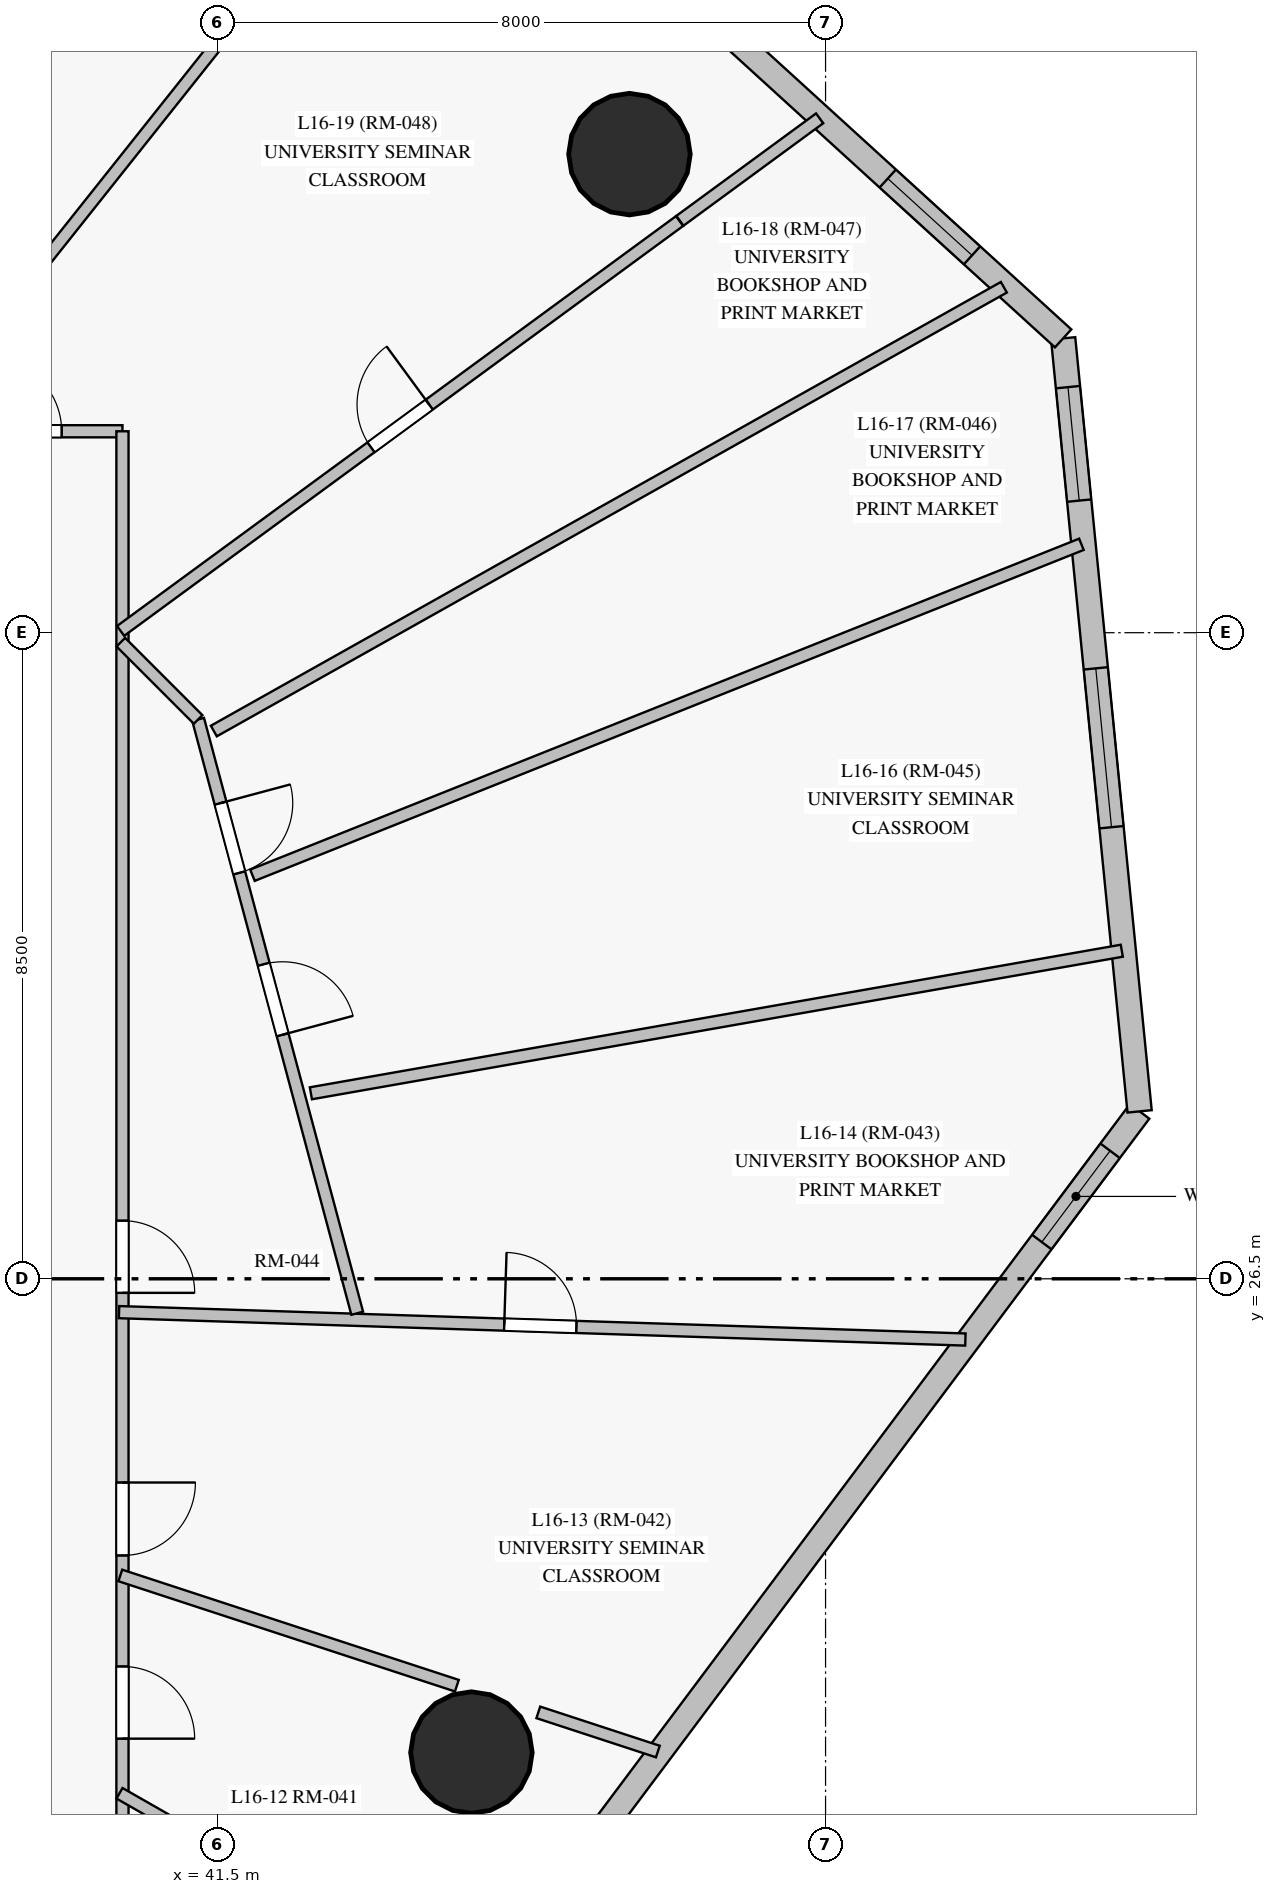
"""IFC4 building model, lengths in metres.
Left out: names, types, materials, properties, quantities, classifications, styles, units other than length and angle.
Written with IfcOpenShell. Run it as: python <this file> out.ifc"""

import sys

from ifc_helpers import new_model, si_unit, direction, frame, frame_2d, origin, origin_with_axes, origin_2d, place, context, subcontext, project, spatial, rectangle, circle, extrude, source, transform, mapped, element, fill, save


model = new_model("IFC4")
c1 = context("Model", 3, precision=1e-05, world=origin(), true_north=direction((0.0, 1.0)))
c2 = subcontext(c1, "Body", "Model", "MODEL_VIEW")
j1 = project(units=[si_unit("LENGTHUNIT", "METRE"), si_unit("PLANEANGLEUNIT", "RADIAN")], contexts=[c1])
p1 = place(None, origin())
s1 = spatial("IfcSite", under=j1, at=p1, CompositionType="ELEMENT")
p2 = place(p1, origin())
s2 = spatial("IfcBuilding", under=s1, at=p2, CompositionType="ELEMENT")
p3 = place(p2, frame((0.0, 0.0, 62.5)))
s3 = spatial("IfcBuildingStorey", under=s2, at=p3, CompositionType="ELEMENT", Elevation=62.5)
m1 = source(origin_with_axes(), c2, "Body", "SweptSolid", [
    extrude(circle(Radius=0.8, at=origin_2d()), origin(), (0.0, 0.0, 1.0), 3.6),
])
for number, where, z_axis, x_axis in (
    (1, (44.841, 20.267, 0.0), (0.0, 0.0, 1.0), (1.0, 0.0, 0.0)),
    (2, (46.92, 41.296, 0.0), (0.0, 0.0, 1.0), (1.0, 0.0, 0.0)),
):
    element("IfcColumn", number, at=place(p3, frame(where, z_axis=z_axis, x_axis=x_axis)), inside=s3, PredefinedType="COLUMN", context=c2, shape_type="MappedRepresentation", body=[
        mapped(m1, transform((0.0, 0.0, 0.0), scale=1.0)),
    ])
p4 = place(p3, frame((44.454, 16.438, 0.0), z_axis=(0.0, 0.0, 1.0), x_axis=(0.599150494903, 0.800636424638, 0.0)))
e3 = element("IfcWall", 3, at=p4, inside=s3, PredefinedType="SOLIDWALL", context=c2, shape_type="SweptSolid", body=[
    extrude(rectangle(XDim=15.318, YDim=0.32, at=frame_2d((7.659, 0.0))), origin(), (0.0, 0.0, 1.0), 3.35),
])
p5 = place(p4, frame((1.194, 0.0, 0.85)))
e4 = element("IfcOpeningElement", 4, at=p5, cuts=e3, PredefinedType="OPENING", context=c2, shape_type="SweptSolid", body=[
    extrude(rectangle(XDim=1.8, YDim=1.85, at=frame_2d((0.9, 0.925))), frame((0.0, 0.17, 0.0), z_axis=(0.0, -1.0, 0.0), x_axis=(1.0, 0.0, 0.0)), (0.0, 0.0, 1.0), 0.34),
])
p6 = place(p4, frame((13.171, 0.0, 0.85)))
e5 = element("IfcOpeningElement", 5, at=p6, cuts=e3, PredefinedType="OPENING", context=c2, shape_type="SweptSolid", body=[
    extrude(rectangle(XDim=1.5, YDim=1.85, at=frame_2d((0.75, 0.925))), frame((0.0, 0.17, 0.0), z_axis=(0.0, -1.0, 0.0), x_axis=(1.0, 0.0, 0.0)), (0.0, 0.0, 1.0), 0.34),
])
p7 = place(p3, frame((53.632, 28.703, 0.0), z_axis=(0.0, 0.0, 1.0), x_axis=(-0.098429761433, 0.995144000667, 0.0)))
e6 = element("IfcWall", 6, at=p7, inside=s3, PredefinedType="SOLIDWALL", context=c2, shape_type="SweptSolid", body=[
    extrude(rectangle(XDim=10.219, YDim=0.32, at=frame_2d((5.109, 0.0))), origin(), (0.0, 0.0, 1.0), 3.35),
])
p8 = place(p7, frame((3.757, 0.0, 0.85)))
e7 = element("IfcOpeningElement", 7, at=p8, cuts=e6, PredefinedType="OPENING", context=c2, shape_type="SweptSolid", body=[
    extrude(rectangle(XDim=2.1, YDim=1.95, at=frame_2d((1.05, 0.975))), frame((0.0, 0.17, 0.0), z_axis=(0.0, -1.0, 0.0), x_axis=(1.0, 0.0, 0.0)), (0.0, 0.0, 1.0), 0.34),
])
p9 = place(p7, frame((8.074, 0.0, 0.85)))
e8 = element("IfcOpeningElement", 8, at=p9, cuts=e6, PredefinedType="OPENING", context=c2, shape_type="SweptSolid", body=[
    extrude(rectangle(XDim=1.5, YDim=1.85, at=frame_2d((0.75, 0.925))), frame((0.0, 0.17, 0.0), z_axis=(0.0, -1.0, 0.0), x_axis=(1.0, 0.0, 0.0)), (0.0, 0.0, 1.0), 0.34),
])
p10 = place(p3, frame((52.626, 38.872, 0.0), z_axis=(0.0, 0.0, 1.0), x_axis=(-0.739069015005, 0.673629713611, 0.0)))
e9 = element("IfcWall", 9, at=p10, inside=s3, PredefinedType="SOLIDWALL", context=c2, shape_type="SweptSolid", body=[
    extrude(rectangle(XDim=12.729, YDim=0.32, at=frame_2d((6.365, 0.0))), origin(), (0.0, 0.0, 1.0), 3.02),
])
p11 = place(p10, frame((1.622, 0.0, 0.85)))
e10 = element("IfcOpeningElement", 10, at=p11, cuts=e9, PredefinedType="OPENING", context=c2, shape_type="SweptSolid", body=[
    extrude(rectangle(XDim=1.5, YDim=1.85, at=frame_2d((0.75, 0.925))), frame((0.0, 0.17, 0.0), z_axis=(0.0, -1.0, 0.0), x_axis=(1.0, 0.0, 0.0)), (0.0, 0.0, 1.0), 0.34),
])
p12 = place(p10, frame((8.089, 0.0, 0.85)))
e11 = element("IfcOpeningElement", 11, at=p12, cuts=e9, PredefinedType="OPENING", context=c2, shape_type="SweptSolid", body=[
    extrude(rectangle(XDim=2.1, YDim=1.95, at=frame_2d((1.05, 0.975))), frame((0.0, 0.17, 0.0), z_axis=(0.0, -1.0, 0.0), x_axis=(1.0, 0.0, 0.0)), (0.0, 0.0, 1.0), 0.34),
])
p13 = place(p3, frame((10.5, 37.65, 0.0), z_axis=(0.0, 0.0, 1.0), x_axis=(1.0, 0.0, 0.0)))
e12 = element("IfcWall", 12, at=p13, inside=s3, PredefinedType="PARTITIONING", context=c2, shape_type="SweptSolid", body=[
    extrude(rectangle(XDim=29.75, YDim=0.16, at=frame_2d((14.875, 0.0))), origin(), (0.0, 0.0, 1.0), 2.75),
])
p14 = place(p13, frame((27.99, 0.0, 0.0)))
e13 = element("IfcOpeningElement", 13, at=p14, cuts=e12, PredefinedType="OPENING", context=c2, shape_type="SweptSolid", body=[
    extrude(rectangle(XDim=0.96, YDim=2.15, at=frame_2d((0.48, 1.075))), frame((0.0, 0.09, 0.0), z_axis=(0.0, -1.0, 0.0), x_axis=(1.0, 0.0, 0.0)), (0.0, 0.0, 1.0), 0.18),
])
p15 = place(p13, frame((25.342, 0.0, 0.0)))
e14 = element("IfcOpeningElement", 14, at=p15, cuts=e12, PredefinedType="OPENING", context=c2, shape_type="SweptSolid", body=[
    extrude(rectangle(XDim=0.95, YDim=2.15, at=frame_2d((0.475, 1.075))), frame((0.0, 0.09, 0.0), z_axis=(0.0, -1.0, 0.0), x_axis=(1.0, 0.0, 0.0)), (0.0, 0.0, 1.0), 0.18),
])
p16 = place(p13, frame((22.028, 0.0, 0.0)))
e15 = element("IfcOpeningElement", 15, at=p16, cuts=e12, PredefinedType="OPENING", context=c2, shape_type="SweptSolid", body=[
    extrude(rectangle(XDim=0.95, YDim=2.15, at=frame_2d((0.475, 1.075))), frame((0.0, 0.09, 0.0), z_axis=(0.0, -1.0, 0.0), x_axis=(1.0, 0.0, 0.0)), (0.0, 0.0, 1.0), 0.18),
])
p17 = place(p13, frame((20.31, 0.0, 0.0)))
e16 = element("IfcOpeningElement", 16, at=p17, cuts=e12, PredefinedType="OPENING", context=c2, shape_type="SweptSolid", body=[
    extrude(rectangle(XDim=0.96, YDim=2.15, at=frame_2d((0.48, 1.075))), frame((0.0, 0.09, 0.0), z_axis=(0.0, -1.0, 0.0), x_axis=(1.0, 0.0, 0.0)), (0.0, 0.0, 1.0), 0.18),
])
p18 = place(p13, frame((14.54, 0.0, 0.0)))
e17 = element("IfcOpeningElement", 17, at=p18, cuts=e12, PredefinedType="OPENING", context=c2, shape_type="SweptSolid", body=[
    extrude(rectangle(XDim=0.95, YDim=2.15, at=frame_2d((0.475, 1.075))), frame((0.0, 0.09, 0.0), z_axis=(0.0, -1.0, 0.0), x_axis=(1.0, 0.0, 0.0)), (0.0, 0.0, 1.0), 0.18),
])
p19 = place(p13, frame((12.43, 0.0, 0.0)))
e18 = element("IfcOpeningElement", 18, at=p19, cuts=e12, PredefinedType="OPENING", context=c2, shape_type="SweptSolid", body=[
    extrude(rectangle(XDim=0.96, YDim=2.15, at=frame_2d((0.48, 1.075))), frame((0.0, 0.09, 0.0), z_axis=(0.0, -1.0, 0.0), x_axis=(1.0, 0.0, 0.0)), (0.0, 0.0, 1.0), 0.18),
])
p20 = place(p13, frame((9.938, 0.0, 0.0)))
e19 = element("IfcOpeningElement", 19, at=p20, cuts=e12, PredefinedType="OPENING", context=c2, shape_type="SweptSolid", body=[
    extrude(rectangle(XDim=0.95, YDim=2.15, at=frame_2d((0.475, 1.075))), frame((0.0, 0.09, 0.0), z_axis=(0.0, -1.0, 0.0), x_axis=(1.0, 0.0, 0.0)), (0.0, 0.0, 1.0), 0.18),
])
p21 = place(p13, frame((6.962, 0.0, 0.0)))
e20 = element("IfcOpeningElement", 20, at=p21, cuts=e12, PredefinedType="OPENING", context=c2, shape_type="SweptSolid", body=[
    extrude(rectangle(XDim=0.95, YDim=2.15, at=frame_2d((0.475, 1.075))), frame((0.0, 0.09, 0.0), z_axis=(0.0, -1.0, 0.0), x_axis=(1.0, 0.0, 0.0)), (0.0, 0.0, 1.0), 0.18),
])
p22 = place(p3, frame((40.25, 37.65, 0.0), z_axis=(0.0, 0.0, 1.0), x_axis=(0.0, -1.0, 0.0)))
e21 = element("IfcWall", 21, at=p22, inside=s3, PredefinedType="PARTITIONING", context=c2, shape_type="SweptSolid", body=[
    extrude(rectangle(XDim=22.3, YDim=0.16, at=frame_2d((11.15, 0.0))), origin(), (0.0, 0.0, 1.0), 2.75),
])
p23 = place(p22, frame((16.25, 0.0, 0.0)))
e22 = element("IfcOpeningElement", 22, at=p23, cuts=e21, PredefinedType="OPENING", context=c2, shape_type="SweptSolid", body=[
    extrude(rectangle(XDim=0.95, YDim=2.15, at=frame_2d((0.475, 1.075))), frame((0.0, 0.09, 0.0), z_axis=(0.0, -1.0, 0.0), x_axis=(1.0, 0.0, 0.0)), (0.0, 0.0, 1.0), 0.18),
])
p24 = place(p22, frame((13.83, 0.0, 0.0)))
e23 = element("IfcOpeningElement", 23, at=p24, cuts=e21, PredefinedType="OPENING", context=c2, shape_type="SweptSolid", body=[
    extrude(rectangle(XDim=0.96, YDim=2.15, at=frame_2d((0.48, 1.075))), frame((0.0, 0.09, 0.0), z_axis=(0.0, -1.0, 0.0), x_axis=(1.0, 0.0, 0.0)), (0.0, 0.0, 1.0), 0.18),
])
p25 = place(p22, frame((10.385, 0.0, 0.0)))
e24 = element("IfcOpeningElement", 24, at=p25, cuts=e21, PredefinedType="OPENING", context=c2, shape_type="SweptSolid", body=[
    extrude(rectangle(XDim=0.95, YDim=2.15, at=frame_2d((0.475, 1.075))), frame((0.0, 0.09, 0.0), z_axis=(0.0, -1.0, 0.0), x_axis=(1.0, 0.0, 0.0)), (0.0, 0.0, 1.0), 0.18),
])
p26 = place(p3, frame((41.452, 33.706, 0.0), z_axis=(0.0, 0.0, 1.0), x_axis=(0.87188055056, 0.489718598335, 0.0)))
e25 = element("IfcWall", 25, at=p26, inside=s3, PredefinedType="PARTITIONING", context=c2, shape_type="SweptSolid", body=[
    extrude(rectangle(XDim=11.921, YDim=0.16, at=frame_2d((5.961, 0.0))), origin(), (0.0, 0.0, 1.0), 3.35),
])
p27 = place(p3, frame((35.215, 37.624, 0.0), z_axis=(0.0, 0.0, 1.0), x_axis=(0.512861528195, 0.858471346579, 0.0)))
e26 = element("IfcWall", 26, at=p27, inside=s3, PredefinedType="PARTITIONING", context=c2, shape_type="SweptSolid", body=[
    extrude(rectangle(XDim=11.914, YDim=0.16, at=frame_2d((5.957, 0.0))), origin(), (0.0, 0.0, 1.0), 3.35),
])
p28 = place(p3, frame((41.96, 31.809, 0.0), z_axis=(0.0, 0.0, 1.0), x_axis=(0.928727403057, 0.370763281368, 0.0)))
e27 = element("IfcWall", 27, at=p28, inside=s3, PredefinedType="PARTITIONING", context=c2, shape_type="SweptSolid", body=[
    extrude(rectangle(XDim=11.743, YDim=0.16, at=frame_2d((5.871, 0.0))), origin(), (0.0, 0.0, 1.0), 3.35),
])
p29 = place(p3, frame((37.426, 37.626, 0.0), z_axis=(0.0, 0.0, 1.0), x_axis=(0.62246479183, 0.782647802611, 0.0)))
e28 = element("IfcWall", 28, at=p29, inside=s3, PredefinedType="PARTITIONING", context=c2, shape_type="SweptSolid", body=[
    extrude(rectangle(XDim=11.16, YDim=0.16, at=frame_2d((5.58, 0.0))), origin(), (0.0, 0.0, 1.0), 3.35),
])
p30 = place(p3, frame((40.205, 26.061, 0.0), z_axis=(0.0, 0.0, 1.0), x_axis=(0.999476714484, -0.032346517653, 0.0)))
e29 = element("IfcWall", 29, at=p30, inside=s3, PredefinedType="PARTITIONING", context=c2, shape_type="SweptSolid", body=[
    extrude(rectangle(XDim=11.14, YDim=0.16, at=frame_2d((5.57, 0.0))), origin(), (0.0, 0.0, 1.0), 3.02),
])
p31 = place(p30, frame((5.07, 0.0, 0.0)))
e30 = element("IfcOpeningElement", 30, at=p31, cuts=e29, PredefinedType="OPENING", context=c2, shape_type="SweptSolid", body=[
    extrude(rectangle(XDim=0.95, YDim=2.15, at=frame_2d((0.475, 1.075))), frame((0.0, 0.09, 0.0), z_axis=(0.0, -1.0, 0.0), x_axis=(1.0, 0.0, 0.0)), (0.0, 0.0, 1.0), 0.18),
])
p32 = place(p3, frame((42.729, 28.94, 0.0), z_axis=(0.0, 0.0, 1.0), x_axis=(0.984896798887, 0.173142414048, 0.0)))
e31 = element("IfcWall", 31, at=p32, inside=s3, PredefinedType="PARTITIONING", context=c2, shape_type="SweptSolid", body=[
    extrude(rectangle(XDim=10.832, YDim=0.16, at=frame_2d((5.416, 0.0))), origin(), (0.0, 0.0, 1.0), 3.35),
])
p33 = place(p3, frame((40.226, 35.023, 0.0), z_axis=(0.0, 0.0, 1.0), x_axis=(0.806433081641, 0.591325362922, 0.0)))
e32 = element("IfcWall", 32, at=p33, inside=s3, PredefinedType="PARTITIONING", context=c2, shape_type="SweptSolid", body=[
    extrude(rectangle(XDim=9.119, YDim=0.16, at=frame_2d((4.56, 0.0))), origin(), (0.0, 0.0, 1.0), 3.35),
])
p34 = place(p33, frame((4.085, 0.0, 0.0)))
e33 = element("IfcOpeningElement", 33, at=p34, cuts=e32, PredefinedType="OPENING", context=c2, shape_type="SweptSolid", body=[
    extrude(rectangle(XDim=0.95, YDim=2.15, at=frame_2d((0.475, 1.075))), frame((0.0, 0.09, 0.0), z_axis=(0.0, -1.0, 0.0), x_axis=(1.0, 0.0, 0.0)), (0.0, 0.0, 1.0), 0.18),
])
p35 = place(p3, frame((41.245, 33.859, 0.0), z_axis=(0.0, 0.0, 1.0), x_axis=(0.258823600504, -0.965924605661, 0.0)))
e34 = element("IfcWall", 34, at=p35, inside=s3, PredefinedType="PARTITIONING", context=c2, shape_type="SweptSolid", body=[
    extrude(rectangle(XDim=8.088, YDim=0.16, at=frame_2d((4.044, 0.0))), origin(), (0.0, 0.0, 1.0), 2.75),
])
p36 = place(p35, frame((3.334, 0.0, 0.0)))
e35 = element("IfcOpeningElement", 35, at=p36, cuts=e34, PredefinedType="OPENING", context=c2, shape_type="SweptSolid", body=[
    extrude(rectangle(XDim=0.96, YDim=2.15, at=frame_2d((0.48, 1.075))), frame((0.0, 0.09, 0.0), z_axis=(0.0, -1.0, 0.0), x_axis=(1.0, 0.0, 0.0)), (0.0, 0.0, 1.0), 0.18),
])
p37 = place(p35, frame((1.139, 0.0, 0.0)))
e36 = element("IfcOpeningElement", 36, at=p37, cuts=e34, PredefinedType="OPENING", context=c2, shape_type="SweptSolid", body=[
    extrude(rectangle(XDim=0.95, YDim=2.15, at=frame_2d((0.475, 1.075))), frame((0.0, 0.09, 0.0), z_axis=(0.0, -1.0, 0.0), x_axis=(1.0, 0.0, 0.0)), (0.0, 0.0, 1.0), 0.18),
])
p38 = place(p3, frame((40.211, 19.731, 0.0), z_axis=(0.0, 0.0, 1.0), x_axis=(0.868019857331, -0.49652948279, 0.0)))
e37 = element("IfcWall", 37, at=p38, inside=s3, PredefinedType="PARTITIONING", context=c2, shape_type="SweptSolid", body=[
    extrude(rectangle(XDim=5.385, YDim=0.16, at=frame_2d((2.692, 0.0))), origin(), (0.0, 0.0, 1.0), 2.7),
])
p39 = place(p3, frame((40.221, 22.597, 0.0), z_axis=(0.0, 0.0, 1.0), x_axis=(0.950315709019, -0.311287733764, 0.0)))
e38 = element("IfcWall", 38, at=p39, inside=s3, PredefinedType="PARTITIONING", context=c2, shape_type="SweptSolid", body=[
    extrude(rectangle(XDim=4.659, YDim=0.16, at=frame_2d((2.33, 0.0))), origin(), (0.0, 0.0, 1.0), 3.35),
])
p40 = place(p3, frame((47.584, 40.419, 0.0), z_axis=(0.0, 0.0, 1.0), x_axis=(0.806418616354, 0.591345089772, 0.0)))
e39 = element("IfcWall", 39, at=p40, inside=s3, PredefinedType="PARTITIONING", context=c2, shape_type="SweptSolid", body=[
    extrude(rectangle(XDim=2.279, YDim=0.16, at=frame_2d((1.14, 0.0))), origin(), (0.0, 0.0, 1.0), 3.35),
])
p41 = place(p3, frame((45.721, 20.796, 0.0), z_axis=(0.0, 0.0, 1.0), x_axis=(0.950366200592, -0.311133548129, 0.0)))
e40 = element("IfcWall", 40, at=p41, inside=s3, PredefinedType="PARTITIONING", context=c2, shape_type="SweptSolid", body=[
    extrude(rectangle(XDim=1.655, YDim=0.16, at=frame_2d((0.827, 0.0))), origin(), (0.0, 0.0, 1.0), 3.35),
])
p42 = place(p3, frame((40.229, 34.875, 0.0), z_axis=(0.0, 0.0, 1.0), x_axis=(0.707106781187, -0.707106781187, 0.0)))
e41 = element("IfcWall", 41, at=p42, inside=s3, PredefinedType="PARTITIONING", context=c2, shape_type="SweptSolid", body=[
    extrude(rectangle(XDim=1.438, YDim=0.16, at=frame_2d((0.719, 0.0))), origin(), (0.0, 0.0, 1.0), 3.35),
])
m2 = source(origin_with_axes(), c2, "Body", "SweptSolid", [
    extrude(rectangle(XDim=1.5, YDim=1.85, at=frame_2d((0.75, 0.925))), frame((0.0, 0.03, 0.0), z_axis=(0.0, -1.0, 0.0), x_axis=(1.0, 0.0, 0.0)), (0.0, 0.0, 1.0), 0.06),
])
p43 = place(p6, origin())
e42 = element("IfcWindow", 42, at=p43, inside=s3, PartitioningType="SINGLE_PANEL", PredefinedType="WINDOW", context=c2, shape_type="MappedRepresentation", body=[
    mapped(m2, transform((0.0, 0.0, 0.0), scale=1.0)),
])
fill(e5, e42)
m3 = source(origin_with_axes(), c2, "Body", "SweptSolid", [
    extrude(rectangle(XDim=2.1, YDim=1.95, at=frame_2d((1.05, 0.975))), frame((0.0, 0.03, 0.0), z_axis=(0.0, -1.0, 0.0), x_axis=(1.0, 0.0, 0.0)), (0.0, 0.0, 1.0), 0.06),
])
p44 = place(p8, origin())
e43 = element("IfcWindow", 43, at=p44, inside=s3, PartitioningType="SINGLE_PANEL", PredefinedType="WINDOW", context=c2, shape_type="MappedRepresentation", body=[
    mapped(m3, transform((0.0, 0.0, 0.0), scale=1.0)),
])
fill(e7, e43)
p45 = place(p9, origin())
e44 = element("IfcWindow", 44, at=p45, inside=s3, PartitioningType="SINGLE_PANEL", PredefinedType="WINDOW", context=c2, shape_type="MappedRepresentation", body=[
    mapped(m2, transform((0.0, 0.0, 0.0), scale=1.0)),
])
fill(e8, e44)
p46 = place(p11, origin())
e45 = element("IfcWindow", 45, at=p46, inside=s3, PartitioningType="SINGLE_PANEL", PredefinedType="WINDOW", context=c2, shape_type="MappedRepresentation", body=[
    mapped(m2, transform((0.0, 0.0, 0.0), scale=1.0)),
])
fill(e10, e45)
m4 = source(origin_with_axes(), c2, "Body", "SweptSolid", [
    extrude(rectangle(XDim=0.95, YDim=2.15, at=frame_2d((0.475, 1.075))), frame((0.0, 0.025, 0.0), z_axis=(0.0, -1.0, 0.0), x_axis=(1.0, 0.0, 0.0)), (0.0, 0.0, 1.0), 0.05),
])
p47 = place(p23, origin())
e46 = element("IfcDoor", 46, at=p47, inside=s3, OperationType="SINGLE_SWING_RIGHT", PredefinedType="DOOR", context=c2, shape_type="MappedRepresentation", body=[
    mapped(m4, transform((0.0, 0.0, 0.0), scale=1.0)),
])
fill(e22, e46)
m5 = source(origin_with_axes(), c2, "Body", "SweptSolid", [
    extrude(rectangle(XDim=0.96, YDim=2.15, at=frame_2d((0.48, 1.075))), frame((0.0, 0.025, 0.0), z_axis=(0.0, -1.0, 0.0), x_axis=(1.0, 0.0, 0.0)), (0.0, 0.0, 1.0), 0.05),
])
p48 = place(p24, origin())
e47 = element("IfcDoor", 47, at=p48, inside=s3, OperationType="SINGLE_SWING_LEFT", PredefinedType="DOOR", context=c2, shape_type="MappedRepresentation", body=[
    mapped(m5, transform((0.0, 0.0, 0.0), scale=1.0)),
])
fill(e23, e47)
p49 = place(p25, origin())
e48 = element("IfcDoor", 48, at=p49, inside=s3, OperationType="SINGLE_SWING_RIGHT", PredefinedType="DOOR", context=c2, shape_type="MappedRepresentation", body=[
    mapped(m4, transform((0.0, 0.0, 0.0), scale=1.0)),
])
fill(e24, e48)
p50 = place(p14, origin())
e49 = element("IfcDoor", 49, at=p50, inside=s3, OperationType="SINGLE_SWING_LEFT", PredefinedType="DOOR", context=c2, shape_type="MappedRepresentation", body=[
    mapped(m5, transform((0.0, 0.0, 0.0), scale=1.0)),
])
fill(e13, e49)
p51 = place(p31, origin())
e50 = element("IfcDoor", 50, at=p51, inside=s3, OperationType="SINGLE_SWING_LEFT", PredefinedType="DOOR", context=c2, shape_type="MappedRepresentation", body=[
    mapped(m4, transform((0.0, 0.0, 0.0), scale=1.0)),
])
fill(e30, e50)
p52 = place(p36, origin())
e51 = element("IfcDoor", 51, at=p52, inside=s3, OperationType="SINGLE_SWING_RIGHT", PredefinedType="DOOR", context=c2, shape_type="MappedRepresentation", body=[
    mapped(m5, transform((0.0, 0.0, 0.0), scale=1.0)),
])
fill(e35, e51)
p53 = place(p37, origin())
e52 = element("IfcDoor", 52, at=p53, inside=s3, OperationType="SINGLE_SWING_LEFT", PredefinedType="DOOR", context=c2, shape_type="MappedRepresentation", body=[
    mapped(m4, transform((0.0, 0.0, 0.0), scale=1.0)),
])
fill(e36, e52)
p54 = place(p34, origin())
e53 = element("IfcDoor", 53, at=p54, inside=s3, OperationType="SINGLE_SWING_RIGHT", PredefinedType="DOOR", context=c2, shape_type="MappedRepresentation", body=[
    mapped(m4, transform((0.0, 0.0, 0.0), scale=1.0)),
])
fill(e33, e53)
save(model, sys.argv[1])
